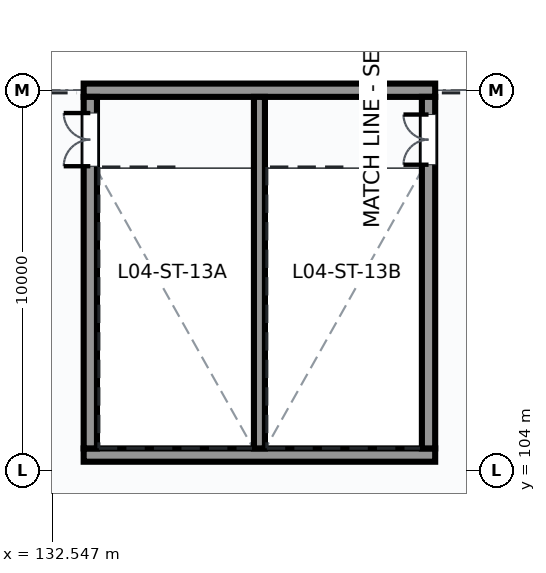
"""IFC4 building model, lengths in metres.
Left out: names, types, materials, properties, quantities, classifications, styles, units other than length and angle.
Written with IfcOpenShell. Run it as: python <this file> out.ifc"""

import sys

from ifc_helpers import new_model, si_unit, direction, frame, frame_2d, origin, place, context, subcontext, project, spatial, rectangle, extrude, element, fill, save


model = new_model("IFC4")
c1 = context("Model", 3, precision=1e-05, world=origin(), true_north=direction((0.0, 1.0)))
c2 = subcontext(c1, "Body", "Model", "MODEL_VIEW")
j1 = project(units=[si_unit("LENGTHUNIT", "METRE"), si_unit("PLANEANGLEUNIT", "RADIAN")], contexts=[c1])
p1 = place(None, origin())
s1 = spatial("IfcSite", under=j1, at=p1, CompositionType="ELEMENT")
p2 = place(p1, origin())
s2 = spatial("IfcBuilding", under=s1, at=p2, CompositionType="ELEMENT")
p3 = place(p2, frame((0.0, 0.0, 19.2)))
s3 = spatial("IfcBuildingStorey", under=s2, at=p3, CompositionType="ELEMENT", Elevation=19.2)
p4 = place(p3, frame((133.375, 104.4, 0.0), z_axis=(0.0, 0.0, 1.0), x_axis=(1.0, 0.0, 0.0)))
e1 = element("IfcWall", 1, at=p4, inside=s3, PredefinedType="SHEAR", context=c2, shape_type="SweptSolid", body=[
    extrude(rectangle(XDim=9.25, YDim=0.35, at=frame_2d((4.625, 0.0))), origin(), (0.0, 0.0, 1.0), 5.4),
])
p5 = place(p3, frame((133.375, 114.0, 0.0), z_axis=(0.0, 0.0, 1.0), x_axis=(1.0, 0.0, 0.0)))
e2 = element("IfcWall", 2, at=p5, inside=s3, PredefinedType="SHEAR", context=c2, shape_type="SweptSolid", body=[
    extrude(rectangle(XDim=9.25, YDim=0.35, at=frame_2d((4.625, 0.0))), origin(), (0.0, 0.0, 1.0), 4.836),
])
p6 = place(p3, frame((133.55, 104.575, 0.0), z_axis=(0.0, 0.0, 1.0), x_axis=(0.0, 1.0, 0.0)))
e3 = element("IfcWall", 3, at=p6, inside=s3, PredefinedType="SHEAR", context=c2, shape_type="SweptSolid", body=[
    extrude(rectangle(XDim=9.25, YDim=0.35, at=frame_2d((4.625, 0.0))), origin(), (0.0, 0.0, 1.0), 5.4),
])
p7 = place(p6, frame((7.425, 0.0, 0.0)))
e4 = element("IfcOpeningElement", 4, at=p7, cuts=e3, PredefinedType="OPENING", context=c2, shape_type="SweptSolid", body=[
    extrude(rectangle(XDim=1.4, YDim=2.2, at=frame_2d((0.7, 1.1))), frame((0.0, 0.185, 0.0), z_axis=(0.0, -1.0, 0.0), x_axis=(1.0, 0.0, 0.0)), (0.0, 0.0, 1.0), 0.37),
])
p8 = place(p3, frame((142.45, 104.575, 0.0), z_axis=(0.0, 0.0, 1.0), x_axis=(0.0, 1.0, 0.0)))
e5 = element("IfcWall", 5, at=p8, inside=s3, PredefinedType="SHEAR", context=c2, shape_type="SweptSolid", body=[
    extrude(rectangle(XDim=9.25, YDim=0.35, at=frame_2d((4.625, 0.0))), origin(), (0.0, 0.0, 1.0), 5.4),
])
p9 = place(p8, frame((7.465, 0.0, 0.0)))
e6 = element("IfcOpeningElement", 6, at=p9, cuts=e5, PredefinedType="OPENING", context=c2, shape_type="SweptSolid", body=[
    extrude(rectangle(XDim=1.32, YDim=2.2, at=frame_2d((0.66, 1.1))), frame((0.0, 0.185, 0.0), z_axis=(0.0, -1.0, 0.0), x_axis=(1.0, 0.0, 0.0)), (0.0, 0.0, 1.0), 0.37),
])
p10 = place(p3, frame((138.0, 104.575, 0.0), z_axis=(0.0, 0.0, 1.0), x_axis=(0.0, 1.0, 0.0)))
e7 = element("IfcWall", 7, at=p10, inside=s3, PredefinedType="SHEAR", context=c2, shape_type="SweptSolid", body=[
    extrude(rectangle(XDim=9.25, YDim=0.29, at=frame_2d((4.625, 0.0))), origin(), (0.0, 0.0, 1.0), 5.4),
])
p11 = place(p7, frame((1.4, 0.0, 0.0), z_axis=(0.0, 0.0, 1.0), x_axis=(-1.0, 0.0, 0.0)))
e8 = element("IfcDoor", 8, at=p11, inside=s3, OperationType="DOUBLE_DOOR_SINGLE_SWING", PredefinedType="DOOR", context=c2, shape_type="SweptSolid", body=[
    extrude(rectangle(XDim=1.4, YDim=2.2, at=frame_2d((0.7, 1.1))), frame((0.0, 0.025, 0.0), z_axis=(0.0, -1.0, 0.0), x_axis=(1.0, 0.0, 0.0)), (0.0, 0.0, 1.0), 0.05),
])
fill(e4, e8)
p12 = place(p9, origin())
e9 = element("IfcDoor", 9, at=p12, inside=s3, OperationType="DOUBLE_DOOR_SINGLE_SWING", PredefinedType="DOOR", context=c2, shape_type="SweptSolid", body=[
    extrude(rectangle(XDim=1.32, YDim=2.2, at=frame_2d((0.66, 1.1))), frame((0.0, 0.025, 0.0), z_axis=(0.0, -1.0, 0.0), x_axis=(1.0, 0.0, 0.0)), (0.0, 0.0, 1.0), 0.05),
])
fill(e6, e9)
save(model, sys.argv[1])
